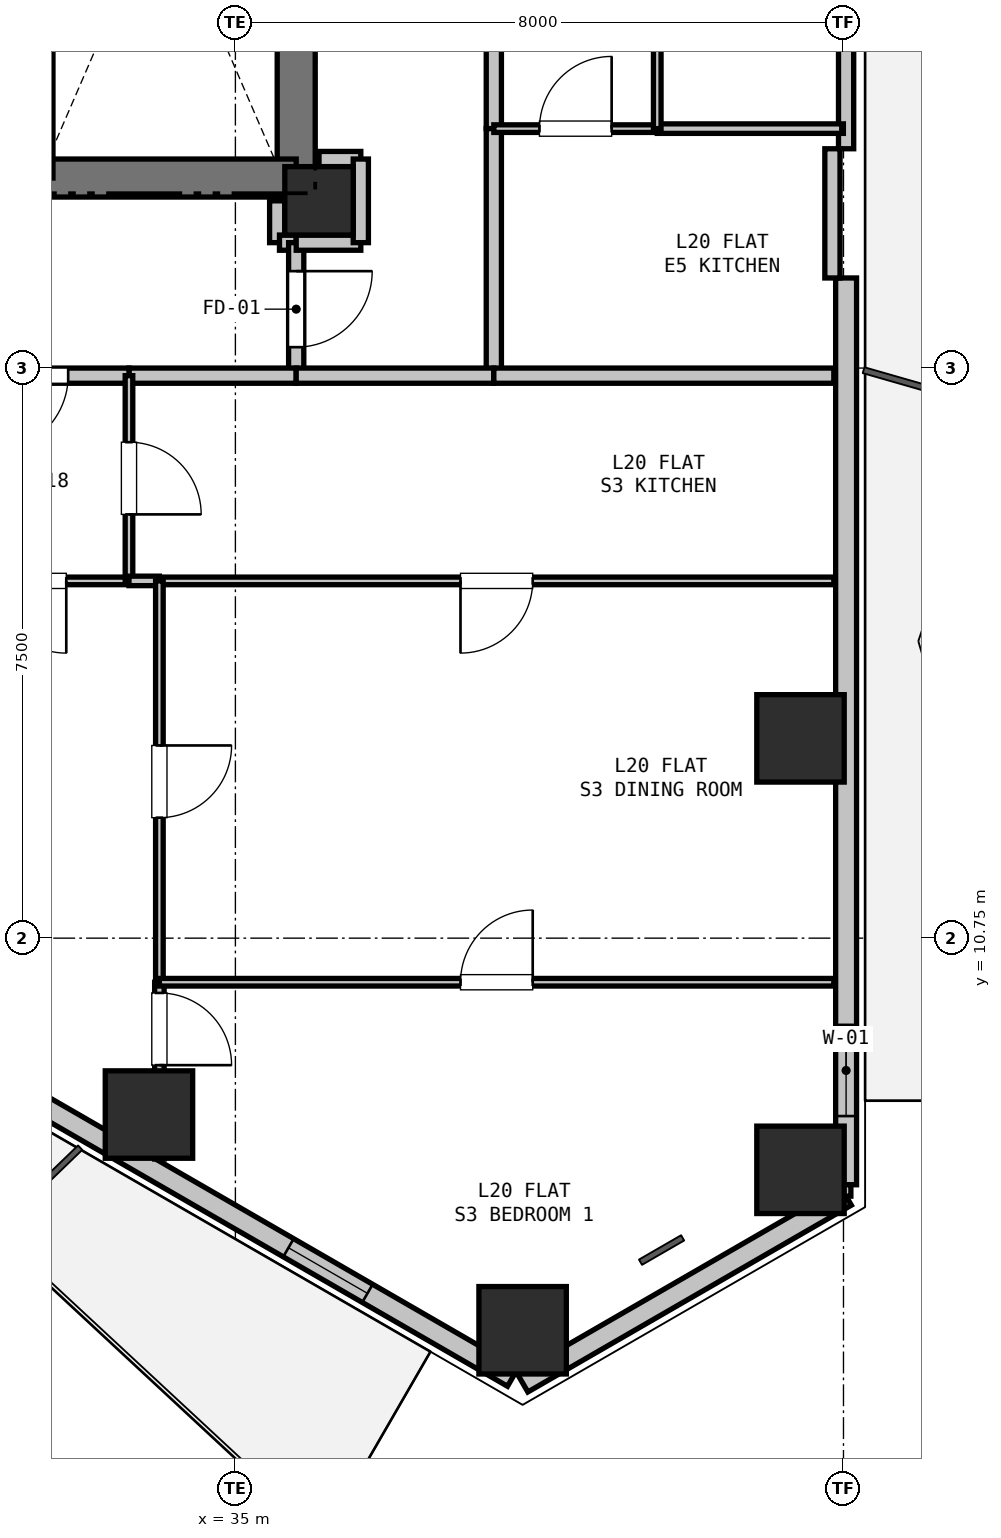
"""IFC4 building model, lengths in metres.
Left out: names, types, materials, properties, quantities, classifications, styles, units other than length and angle.
Written with IfcOpenShell. Run it as: python <this file> out.ifc"""

import sys

from ifc_helpers import new_model, si_unit, direction, frame, frame_2d, origin, origin_2d, place, context, subcontext, project, spatial, rectangle, hollow_rectangle, extrude, element, fill, save


model = new_model("IFC4")
c1 = context("Model", 3, precision=1e-05, world=origin(), true_north=direction((0.0, 1.0)))
c2 = subcontext(c1, "Body", "Model", "MODEL_VIEW")
j1 = project(units=[si_unit("LENGTHUNIT", "METRE"), si_unit("PLANEANGLEUNIT", "RADIAN")], contexts=[c1])
p1 = place(None, origin())
s1 = spatial("IfcSite", under=j1, at=p1, CompositionType="ELEMENT")
p2 = place(p1, origin())
s2 = spatial("IfcBuilding", under=s1, at=p2, CompositionType="ELEMENT")
p3 = place(p2, frame((0.0, 0.0, 76.8)))
s3 = spatial("IfcBuildingStorey", under=s2, at=p3, CompositionType="ELEMENT", Elevation=76.8)
p4 = place(p3, frame((36.1, 20.45, 0.0), z_axis=(0.0, 0.0, 1.0), x_axis=(1.0, 0.0, 0.0)))
e1 = element("IfcColumn", 1, at=p4, inside=s3, PredefinedType="COLUMN", context=c2, shape_type="SweptSolid", body=[
    extrude(rectangle(XDim=0.9, YDim=0.9, at=origin_2d()), origin(), (0.0, 0.0, 1.0), 3.3),
])
for number, where, z_axis, x_axis in (
    (2, (42.435, 13.378, 0.0), (0.0, 0.0, 1.0), (1.0, 0.0, 0.0)),
    (3, (42.435, 7.702, 0.0), (0.0, 0.0, 1.0), (1.0, 0.0, 0.0)),
    (4, (38.779, 5.591, 0.0), (0.0, 0.0, 1.0), (1.0, 0.0, 0.0)),
    (5, (33.863, 8.429, 0.0), (0.0, 0.0, 1.0), (1.0, 0.0, 0.0)),
):
    element("IfcColumn", number, at=place(p3, frame(where, z_axis=z_axis, x_axis=x_axis)), inside=s3, PredefinedType="COLUMN", context=c2, shape_type="SweptSolid", body=[
        extrude(hollow_rectangle(XDim=1.15, YDim=1.15, WallThickness=0.032, at=origin_2d()), origin(), (0.0, 0.0, 1.0), 3.3),
    ])
p5 = place(p3, frame((43.035, 7.356, 0.0), z_axis=(0.0, 0.0, 1.0), x_axis=(-0.866011848704, -0.500023477353, 0.0)))
e6 = element("IfcWall", 6, at=p5, inside=s3, PredefinedType="SOLIDWALL", context=c2, shape_type="SweptSolid", body=[
    extrude(rectangle(XDim=4.914, YDim=0.275, at=frame_2d((2.457, 0.0))), origin(), (0.0, 0.0, 1.0), 2.67),
])
p6 = place(p3, frame((43.035, 32.365, 0.0), z_axis=(0.0, 0.0, 1.0), x_axis=(0.0, -1.0, 0.0)))
e7 = element("IfcWall", 7, at=p6, inside=s3, PredefinedType="PARAPET", context=c2, shape_type="SweptSolid", body=[
    extrude(rectangle(XDim=11.229, YDim=0.2, at=frame_2d((5.615, 0.0))), origin(), (0.0, 0.0, 1.0), 0.2),
])
p7 = place(p3, frame((43.035, 19.435, 0.0), z_axis=(0.0, 0.0, 1.0), x_axis=(0.0, -1.0, 0.0)))
e8 = element("IfcWall", 8, at=p7, inside=s3, PredefinedType="SOLIDWALL", context=c2, shape_type="SweptSolid", body=[
    extrude(rectangle(XDim=11.93, YDim=0.275, at=frame_2d((5.965, 0.0))), origin(), (0.0, 0.0, 1.0), 2.67),
])
p8 = place(p7, frame((9.826, 0.0, 0.9)))
e9 = element("IfcOpeningElement", 9, at=p8, cuts=e8, PredefinedType="OPENING", context=c2, shape_type="SweptSolid", body=[
    extrude(rectangle(XDim=1.2, YDim=1.4, at=frame_2d((0.6, 0.7))), frame((0.0, 0.147, 0.0), z_axis=(0.0, -1.0, 0.0), x_axis=(1.0, 0.0, 0.0)), (0.0, 0.0, 1.0), 0.295),
])
p9 = place(p3, frame((42.854, 21.135, 0.0), z_axis=(0.0, 0.0, 1.0), x_axis=(0.0, -1.0, 0.0)))
e10 = element("IfcWall", 10, at=p9, inside=s3, PredefinedType="PARAPET", context=c2, shape_type="SweptSolid", body=[
    extrude(rectangle(XDim=1.7, YDim=0.2, at=frame_2d((0.85, 0.0))), origin(), (0.0, 0.0, 1.0), 2.67),
])
p10 = place(p3, frame((38.649, 4.973, 0.0), z_axis=(0.0, 0.0, 1.0), x_axis=(-0.866023023012, 0.500004123596, 0.0)))
e11 = element("IfcWall", 11, at=p10, inside=s3, PredefinedType="SOLIDWALL", context=c2, shape_type="SweptSolid", body=[
    extrude(rectangle(XDim=11.93, YDim=0.275, at=frame_2d((5.965, 0.0))), origin(), (0.0, 0.0, 1.0), 2.67),
])
p11 = place(p10, frame((7.616, 0.0, 0.0)))
e12 = element("IfcOpeningElement", 12, at=p11, cuts=e11, PredefinedType="OPENING", context=c2, shape_type="SweptSolid", body=[
    extrude(rectangle(XDim=1.0, YDim=2.1, at=frame_2d((0.5, 1.05))), frame((0.0, 0.147, 0.0), z_axis=(0.0, -1.0, 0.0), x_axis=(1.0, 0.0, 0.0)), (0.0, 0.0, 1.0), 0.295),
])
p12 = place(p10, frame((2.207, 0.0, 0.9)))
e13 = element("IfcOpeningElement", 13, at=p12, cuts=e11, PredefinedType="OPENING", context=c2, shape_type="SweptSolid", body=[
    extrude(rectangle(XDim=1.2, YDim=1.4, at=frame_2d((0.6, 0.7))), frame((0.0, 0.147, 0.0), z_axis=(0.0, -1.0, 0.0), x_axis=(1.0, 0.0, 0.0)), (0.0, 0.0, 1.0), 0.295),
])
p13 = place(p3, frame((35.8, 28.1, 0.0), z_axis=(0.0, 0.0, 1.0), x_axis=(0.0, -1.0, 0.0)))
e14 = element("IfcWall", 14, at=p13, inside=s3, PredefinedType="SHEAR", context=c2, shape_type="SweptSolid", body=[
    extrude(rectangle(XDim=7.35, YDim=0.5, at=frame_2d((3.675, 0.0))), origin(), (0.0, 0.0, 1.0), 3.05),
])
p14 = place(p3, frame((35.8, 20.75, 0.0), z_axis=(0.0, 0.0, 1.0), x_axis=(-1.0, 0.0, 0.0)))
e15 = element("IfcWall", 15, at=p14, inside=s3, PredefinedType="SHEAR", context=c2, shape_type="SweptSolid", body=[
    extrude(rectangle(XDim=3.45, YDim=0.5, at=frame_2d((1.725, 0.0))), origin(), (0.0, 0.0, 1.0), 3.05),
])
p15 = place(p3, frame((35.55, 20.45, 0.0), z_axis=(0.0, 0.0, 1.0), x_axis=(0.0, -1.0, 0.0)))
e16 = element("IfcWall", 16, at=p15, inside=s3, PredefinedType="PARTITIONING", context=c2, shape_type="SweptSolid", body=[
    extrude(rectangle(XDim=0.55, YDim=0.2, at=frame_2d((0.275, 0.0))), origin(), (0.0, 0.0, 1.0), 2.498),
])
p16 = place(p3, frame((35.58, 19.9, 0.0), z_axis=(0.0, 0.0, 1.0), x_axis=(1.0, 0.0, 0.0)))
e17 = element("IfcWall", 17, at=p16, inside=s3, PredefinedType="PARTITIONING", context=c2, shape_type="SweptSolid", body=[
    extrude(rectangle(XDim=0.22, YDim=0.2, at=frame_2d((0.11, 0.0))), origin(), (0.0, 0.0, 1.0), 3.05),
])
p17 = place(p3, frame((35.8, 19.9, 0.0), z_axis=(0.0, 0.0, 1.0), x_axis=(0.0, -1.0, 0.0)))
e18 = element("IfcWall", 18, at=p17, inside=s3, PredefinedType="PARTITIONING", context=c2, shape_type="SweptSolid", body=[
    extrude(rectangle(XDim=1.75, YDim=0.2, at=frame_2d((0.875, 0.0))), origin(), (0.0, 0.0, 1.0), 3.05),
])
p18 = place(p17, frame((0.375, 0.0, 0.0)))
e19 = element("IfcOpeningElement", 19, at=p18, cuts=e18, PredefinedType="OPENING", context=c2, shape_type="SweptSolid", body=[
    extrude(rectangle(XDim=1.0, YDim=2.15, at=frame_2d((0.5, 1.075))), frame((0.0, 0.11, 0.0), z_axis=(0.0, -1.0, 0.0), x_axis=(1.0, 0.0, 0.0)), (0.0, 0.0, 1.0), 0.22),
])
p19 = place(p3, frame((35.8, 18.15, 0.0), z_axis=(0.0, 0.0, 1.0), x_axis=(-1.0, 0.0, 0.0)))
e20 = element("IfcWall", 20, at=p19, inside=s3, PredefinedType="PARTITIONING", context=c2, shape_type="SweptSolid", body=[
    extrude(rectangle(XDim=2.2, YDim=0.2, at=frame_2d((1.1, 0.0))), origin(), (0.0, 0.0, 1.0), 3.05),
])
p20 = place(p3, frame((33.6, 18.15, 0.0), z_axis=(0.0, 0.0, 1.0), x_axis=(-1.0, 0.0, 0.0)))
e21 = element("IfcWall", 21, at=p20, inside=s3, PredefinedType="PARTITIONING", context=c2, shape_type="SweptSolid", body=[
    extrude(rectangle(XDim=2.6, YDim=0.2, at=frame_2d((1.3, 0.0))), origin(), (0.0, 0.0, 1.0), 3.05),
])
p21 = place(p20, frame((0.8, 0.0, 0.0)))
e22 = element("IfcOpeningElement", 22, at=p21, cuts=e21, PredefinedType="OPENING", context=c2, shape_type="SweptSolid", body=[
    extrude(rectangle(XDim=1.0, YDim=2.15, at=frame_2d((0.5, 1.075))), frame((0.0, 0.11, 0.0), z_axis=(0.0, -1.0, 0.0), x_axis=(1.0, 0.0, 0.0)), (0.0, 0.0, 1.0), 0.22),
])
p22 = place(p3, frame((36.65, 21.0, 0.0), z_axis=(0.0, 0.0, 1.0), x_axis=(-1.0, 0.0, 0.0)))
e23 = element("IfcWall", 23, at=p22, inside=s3, PredefinedType="PARTITIONING", context=c2, shape_type="SweptSolid", body=[
    extrude(rectangle(XDim=0.55, YDim=0.2, at=frame_2d((0.275, 0.0))), origin(), (0.0, 0.0, 1.0), 2.498),
])
p23 = place(p3, frame((38.4, 24.8, 0.0), z_axis=(0.0, 0.0, 1.0), x_axis=(0.0, -1.0, 0.0)))
e24 = element("IfcWall", 24, at=p23, inside=s3, PredefinedType="PARTITIONING", context=c2, shape_type="SweptSolid", body=[
    extrude(rectangle(XDim=3.4, YDim=0.2, at=frame_2d((1.7, 0.0))), origin(), (0.0, 0.0, 1.0), 3.05),
])
p24 = place(p3, frame((38.4, 21.4, 0.0), z_axis=(0.0, 0.0, 1.0), x_axis=(0.0, -1.0, 0.0)))
e25 = element("IfcWall", 25, at=p24, inside=s3, PredefinedType="PARTITIONING", context=c2, shape_type="SweptSolid", body=[
    extrude(rectangle(XDim=3.25, YDim=0.2, at=frame_2d((1.625, 0.0))), origin(), (0.0, 0.0, 1.0), 3.05),
])
p25 = place(p3, frame((38.4, 18.15, 0.0), z_axis=(0.0, 0.0, 1.0), x_axis=(-1.0, 0.0, 0.0)))
e26 = element("IfcWall", 26, at=p25, inside=s3, PredefinedType="PARTITIONING", context=c2, shape_type="SweptSolid", body=[
    extrude(rectangle(XDim=2.6, YDim=0.2, at=frame_2d((1.3, 0.0))), origin(), (0.0, 0.0, 1.0), 2.423),
])
p26 = place(p3, frame((35.8, 19.9, 0.0), z_axis=(0.0, 0.0, 1.0), x_axis=(1.0, 0.0, 0.0)))
e27 = element("IfcWall", 27, at=p26, inside=s3, PredefinedType="PARTITIONING", context=c2, shape_type="SweptSolid", body=[
    extrude(rectangle(XDim=0.85, YDim=0.2, at=frame_2d((0.425, 0.0))), origin(), (0.0, 0.0, 1.0), 2.423),
])
p27 = place(p3, frame((36.65, 19.9, 0.0), z_axis=(0.0, 0.0, 1.0), x_axis=(0.0, 1.0, 0.0)))
e28 = element("IfcWall", 28, at=p27, inside=s3, PredefinedType="PARTITIONING", context=c2, shape_type="SweptSolid", body=[
    extrude(rectangle(XDim=1.1, YDim=0.2, at=frame_2d((0.55, 0.0))), origin(), (0.0, 0.0, 1.0), 3.05),
])
p28 = place(p3, frame((33.6, 15.45, 0.0), z_axis=(0.0, 0.0, 1.0), x_axis=(-1.0, 0.0, 0.0)))
e29 = element("IfcWall", 29, at=p28, inside=s3, PredefinedType="PARTITIONING", context=c2, shape_type="SweptSolid", body=[
    extrude(rectangle(XDim=2.6, YDim=0.1, at=frame_2d((1.3, 0.0))), origin(), (0.0, 0.0, 1.0), 3.05),
])
p29 = place(p28, frame((0.825, 0.0, 0.0)))
e30 = element("IfcOpeningElement", 30, at=p29, cuts=e29, PredefinedType="OPENING", context=c2, shape_type="SweptSolid", body=[
    extrude(rectangle(XDim=0.95, YDim=2.1, at=frame_2d((0.475, 1.05))), frame((0.0, 0.06, 0.0), z_axis=(0.0, -1.0, 0.0), x_axis=(1.0, 0.0, 0.0)), (0.0, 0.0, 1.0), 0.12),
])
p30 = place(p3, frame((33.6, 18.15, 0.0), z_axis=(0.0, 0.0, 1.0), x_axis=(0.0, -1.0, 0.0)))
e31 = element("IfcWall", 31, at=p30, inside=s3, PredefinedType="PARTITIONING", context=c2, shape_type="SweptSolid", body=[
    extrude(rectangle(XDim=2.7, YDim=0.1, at=frame_2d((1.35, 0.0))), origin(), (0.0, 0.0, 1.0), 3.05),
])
p31 = place(p30, frame((0.875, 0.0, 0.0)))
e32 = element("IfcOpeningElement", 32, at=p31, cuts=e31, PredefinedType="OPENING", context=c2, shape_type="SweptSolid", body=[
    extrude(rectangle(XDim=0.95, YDim=2.1, at=frame_2d((0.475, 1.05))), frame((0.0, 0.06, 0.0), z_axis=(0.0, -1.0, 0.0), x_axis=(1.0, 0.0, 0.0)), (0.0, 0.0, 1.0), 0.12),
])
p32 = place(p3, frame((38.4, 18.15, 0.0), z_axis=(0.0, 0.0, 1.0), x_axis=(1.0, 0.0, 0.0)))
e33 = element("IfcWall", 33, at=p32, inside=s3, PredefinedType="PARTITIONING", context=c2, shape_type="SweptSolid", body=[
    extrude(rectangle(XDim=4.473, YDim=0.2, at=frame_2d((2.237, 0.0))), origin(), (0.0, 0.0, 1.0), 2.365),
])
p33 = place(p3, frame((42.873, 15.45, 0.0), z_axis=(0.0, 0.0, 1.0), x_axis=(-1.0, 0.0, 0.0)))
e34 = element("IfcWall", 34, at=p33, inside=s3, PredefinedType="PARTITIONING", context=c2, shape_type="SweptSolid", body=[
    extrude(rectangle(XDim=8.873, YDim=0.1, at=frame_2d((4.437, 0.0))), origin(), (0.0, 0.0, 1.0), 2.365),
])
p34 = place(p33, frame((3.962, 0.0, 0.0)))
e35 = element("IfcOpeningElement", 35, at=p34, cuts=e34, PredefinedType="OPENING", context=c2, shape_type="SweptSolid", body=[
    extrude(rectangle(XDim=0.95, YDim=2.1, at=frame_2d((0.475, 1.05))), frame((0.0, 0.06, 0.0), z_axis=(0.0, -1.0, 0.0), x_axis=(1.0, 0.0, 0.0)), (0.0, 0.0, 1.0), 0.12),
])
p35 = place(p3, frame((34.0, 15.45, 0.0), z_axis=(0.0, 0.0, 1.0), x_axis=(-1.0, 0.0, 0.0)))
e36 = element("IfcWall", 36, at=p35, inside=s3, PredefinedType="PARTITIONING", context=c2, shape_type="SweptSolid", body=[
    extrude(rectangle(XDim=0.4, YDim=0.125, at=frame_2d((0.2, 0.0))), origin(), (0.0, 0.0, 1.0), 3.05),
])
p36 = place(p3, frame((38.4, 21.4, 0.0), z_axis=(0.0, 0.0, 1.0), x_axis=(1.0, 0.0, 0.0)))
e37 = element("IfcWall", 37, at=p36, inside=s3, PredefinedType="PARTITIONING", context=c2, shape_type="SweptSolid", body=[
    extrude(rectangle(XDim=2.15, YDim=0.1, at=frame_2d((1.075, 0.0))), origin(), (0.0, 0.0, 1.0), 3.05),
])
p37 = place(p36, frame((0.6, 0.0, 0.0)))
e38 = element("IfcOpeningElement", 38, at=p37, cuts=e37, PredefinedType="OPENING", context=c2, shape_type="SweptSolid", body=[
    extrude(rectangle(XDim=0.95, YDim=2.1, at=frame_2d((0.475, 1.05))), frame((0.0, 0.06, 0.0), z_axis=(0.0, -1.0, 0.0), x_axis=(1.0, 0.0, 0.0)), (0.0, 0.0, 1.0), 0.12),
])
p38 = place(p3, frame((40.55, 21.4, 0.0), z_axis=(0.0, 0.0, 1.0), x_axis=(1.0, 0.0, 0.0)))
e39 = element("IfcWall", 39, at=p38, inside=s3, PredefinedType="PARTITIONING", context=c2, shape_type="SweptSolid", body=[
    extrude(rectangle(XDim=2.448, YDim=0.125, at=frame_2d((1.224, 0.0))), origin(), (0.0, 0.0, 1.0), 2.365),
])
p39 = place(p3, frame((34.0, 15.45, 0.0), z_axis=(0.0, 0.0, 1.0), x_axis=(0.0, -1.0, 0.0)))
e40 = element("IfcWall", 40, at=p39, inside=s3, PredefinedType="PARTITIONING", context=c2, shape_type="SweptSolid", body=[
    extrude(rectangle(XDim=5.28, YDim=0.1, at=frame_2d((2.64, 0.0))), origin(), (0.0, 0.0, 1.0), 3.05),
])
p40 = place(p39, frame((2.165, 0.0, 0.0)))
e41 = element("IfcOpeningElement", 41, at=p40, cuts=e40, PredefinedType="OPENING", context=c2, shape_type="SweptSolid", body=[
    extrude(rectangle(XDim=0.95, YDim=2.1, at=frame_2d((0.475, 1.05))), frame((0.0, 0.06, 0.0), z_axis=(0.0, -1.0, 0.0), x_axis=(1.0, 0.0, 0.0)), (0.0, 0.0, 1.0), 0.12),
])
p41 = place(p3, frame((34.0, 10.17, 0.0), z_axis=(0.0, 0.0, 1.0), x_axis=(0.0, -1.0, 0.0)))
e42 = element("IfcWall", 42, at=p41, inside=s3, PredefinedType="PARTITIONING", context=c2, shape_type="SweptSolid", body=[
    extrude(rectangle(XDim=2.326, YDim=0.125, at=frame_2d((1.163, 0.0))), origin(), (0.0, 0.0, 1.0), 3.05),
])
p42 = place(p41, frame((0.141, 0.0, 0.0)))
e43 = element("IfcOpeningElement", 43, at=p42, cuts=e42, PredefinedType="OPENING", context=c2, shape_type="SweptSolid", body=[
    extrude(rectangle(XDim=0.95, YDim=2.1, at=frame_2d((0.475, 1.05))), frame((0.0, 0.073, 0.0), z_axis=(0.0, -1.0, 0.0), x_axis=(1.0, 0.0, 0.0)), (0.0, 0.0, 1.0), 0.145),
])
p43 = place(p3, frame((34.0, 10.17, 0.0), z_axis=(0.0, 0.0, 1.0), x_axis=(1.0, 0.0, 0.0)))
e44 = element("IfcWall", 44, at=p43, inside=s3, PredefinedType="PARTITIONING", context=c2, shape_type="SweptSolid", body=[
    extrude(rectangle(XDim=8.873, YDim=0.1, at=frame_2d((4.437, 0.0))), origin(), (0.0, 0.0, 1.0), 2.423),
])
p44 = place(p43, frame((3.962, 0.0, 0.0)))
e45 = element("IfcOpeningElement", 45, at=p44, cuts=e44, PredefinedType="OPENING", context=c2, shape_type="SweptSolid", body=[
    extrude(rectangle(XDim=0.95, YDim=2.1, at=frame_2d((0.475, 1.05))), frame((0.0, 0.06, 0.0), z_axis=(0.0, -1.0, 0.0), x_axis=(1.0, 0.0, 0.0)), (0.0, 0.0, 1.0), 0.12),
])
p45 = place(p3, frame((43.035, 7.506, 0.0), z_axis=(0.0, 0.0, 1.0), x_axis=(0.0, -1.0, 0.0)))
e46 = element("IfcWall", 46, at=p45, inside=s3, PredefinedType="PARTITIONING", context=c2, shape_type="SweptSolid", body=[
    extrude(rectangle(XDim=0.15, YDim=0.125, at=frame_2d((0.075, 0.0))), origin(), (0.0, 0.0, 1.0), 3.05),
])
p46 = place(p3, frame((40.55, 21.4, 0.0), z_axis=(0.0, 0.0, 1.0), x_axis=(0.0, 1.0, 0.0)))
e47 = element("IfcWall", 47, at=p46, inside=s3, PredefinedType="PARTITIONING", context=c2, shape_type="SweptSolid", body=[
    extrude(rectangle(XDim=3.4, YDim=0.1, at=frame_2d((1.7, 0.0))), origin(), (0.0, 0.0, 1.0), 3.05),
])
p47 = place(p46, frame((1.225, 0.0, 0.0)))
e48 = element("IfcOpeningElement", 48, at=p47, cuts=e47, PredefinedType="OPENING", context=c2, shape_type="SweptSolid", body=[
    extrude(rectangle(XDim=0.95, YDim=2.1, at=frame_2d((0.475, 1.05))), frame((0.0, 0.06, 0.0), z_axis=(0.0, -1.0, 0.0), x_axis=(1.0, 0.0, 0.0)), (0.0, 0.0, 1.0), 0.12),
])
p48 = place(p8, origin())
e49 = element("IfcWindow", 49, at=p48, inside=s3, PartitioningType="SINGLE_PANEL", PredefinedType="WINDOW", context=c2, shape_type="SweptSolid", body=[
    extrude(rectangle(XDim=1.2, YDim=1.4, at=frame_2d((0.6, 0.7))), frame((0.0, 0.03, 0.0), z_axis=(0.0, -1.0, 0.0), x_axis=(1.0, 0.0, 0.0)), (0.0, 0.0, 1.0), 0.06),
])
fill(e9, e49)
p49 = place(p12, origin())
e50 = element("IfcWindow", 50, at=p49, inside=s3, PartitioningType="SINGLE_PANEL", PredefinedType="WINDOW", context=c2, shape_type="SweptSolid", body=[
    extrude(rectangle(XDim=1.2, YDim=1.4, at=frame_2d((0.6, 0.7))), frame((0.0, 0.03, 0.0), z_axis=(0.0, -1.0, 0.0), x_axis=(1.0, 0.0, 0.0)), (0.0, 0.0, 1.0), 0.06),
])
fill(e13, e50)
p50 = place(p18, origin())
e51 = element("IfcDoor", 51, at=p50, inside=s3, OperationType="SINGLE_SWING_LEFT", PredefinedType="DOOR", context=c2, shape_type="SweptSolid", body=[
    extrude(rectangle(XDim=1.0, YDim=2.15, at=frame_2d((0.5, 1.075))), frame((0.0, 0.025, 0.0), z_axis=(0.0, -1.0, 0.0), x_axis=(1.0, 0.0, 0.0)), (0.0, 0.0, 1.0), 0.05),
])
fill(e19, e51)
p51 = place(p21, origin())
e52 = element("IfcDoor", 52, at=p51, inside=s3, OperationType="SINGLE_SWING_RIGHT", PredefinedType="DOOR", context=c2, shape_type="SweptSolid", body=[
    extrude(rectangle(XDim=1.0, YDim=2.15, at=frame_2d((0.5, 1.075))), frame((0.0, 0.025, 0.0), z_axis=(0.0, -1.0, 0.0), x_axis=(1.0, 0.0, 0.0)), (0.0, 0.0, 1.0), 0.05),
])
fill(e22, e52)
p52 = place(p31, origin())
e53 = element("IfcDoor", 53, at=p52, inside=s3, OperationType="SINGLE_SWING_RIGHT", PredefinedType="DOOR", context=c2, shape_type="SweptSolid", body=[
    extrude(rectangle(XDim=0.95, YDim=2.1, at=frame_2d((0.475, 1.05))), frame((0.0, 0.025, 0.0), z_axis=(0.0, -1.0, 0.0), x_axis=(1.0, 0.0, 0.0)), (0.0, 0.0, 1.0), 0.05),
])
fill(e32, e53)
p53 = place(p29, origin())
e54 = element("IfcDoor", 54, at=p53, inside=s3, OperationType="SINGLE_SWING_LEFT", PredefinedType="DOOR", context=c2, shape_type="SweptSolid", body=[
    extrude(rectangle(XDim=0.95, YDim=2.1, at=frame_2d((0.475, 1.05))), frame((0.0, 0.025, 0.0), z_axis=(0.0, -1.0, 0.0), x_axis=(1.0, 0.0, 0.0)), (0.0, 0.0, 1.0), 0.05),
])
fill(e30, e54)
p54 = place(p34, origin())
e55 = element("IfcDoor", 55, at=p54, inside=s3, OperationType="SINGLE_SWING_RIGHT", PredefinedType="DOOR", context=c2, shape_type="SweptSolid", body=[
    extrude(rectangle(XDim=0.95, YDim=2.1, at=frame_2d((0.475, 1.05))), frame((0.0, 0.025, 0.0), z_axis=(0.0, -1.0, 0.0), x_axis=(1.0, 0.0, 0.0)), (0.0, 0.0, 1.0), 0.05),
])
fill(e35, e55)
p55 = place(p37, origin())
e56 = element("IfcDoor", 56, at=p55, inside=s3, OperationType="SINGLE_SWING_RIGHT", PredefinedType="DOOR", context=c2, shape_type="SweptSolid", body=[
    extrude(rectangle(XDim=0.95, YDim=2.1, at=frame_2d((0.475, 1.05))), frame((0.0, 0.025, 0.0), z_axis=(0.0, -1.0, 0.0), x_axis=(1.0, 0.0, 0.0)), (0.0, 0.0, 1.0), 0.05),
])
fill(e38, e56)
p56 = place(p42, origin())
e57 = element("IfcDoor", 57, at=p56, inside=s3, OperationType="SINGLE_SWING_RIGHT", PredefinedType="DOOR", context=c2, shape_type="SweptSolid", body=[
    extrude(rectangle(XDim=0.95, YDim=2.1, at=frame_2d((0.475, 1.05))), frame((0.0, 0.025, 0.0), z_axis=(0.0, -1.0, 0.0), x_axis=(1.0, 0.0, 0.0)), (0.0, 0.0, 1.0), 0.05),
])
fill(e43, e57)
p57 = place(p40, origin())
e58 = element("IfcDoor", 58, at=p57, inside=s3, OperationType="SINGLE_SWING_LEFT", PredefinedType="DOOR", context=c2, shape_type="SweptSolid", body=[
    extrude(rectangle(XDim=0.95, YDim=2.1, at=frame_2d((0.475, 1.05))), frame((0.0, 0.025, 0.0), z_axis=(0.0, -1.0, 0.0), x_axis=(1.0, 0.0, 0.0)), (0.0, 0.0, 1.0), 0.05),
])
fill(e41, e58)
p58 = place(p44, origin())
e59 = element("IfcDoor", 59, at=p58, inside=s3, OperationType="SINGLE_SWING_RIGHT", PredefinedType="DOOR", context=c2, shape_type="SweptSolid", body=[
    extrude(rectangle(XDim=0.95, YDim=2.1, at=frame_2d((0.475, 1.05))), frame((0.0, 0.025, 0.0), z_axis=(0.0, -1.0, 0.0), x_axis=(1.0, 0.0, 0.0)), (0.0, 0.0, 1.0), 0.05),
])
fill(e45, e59)
save(model, sys.argv[1])
